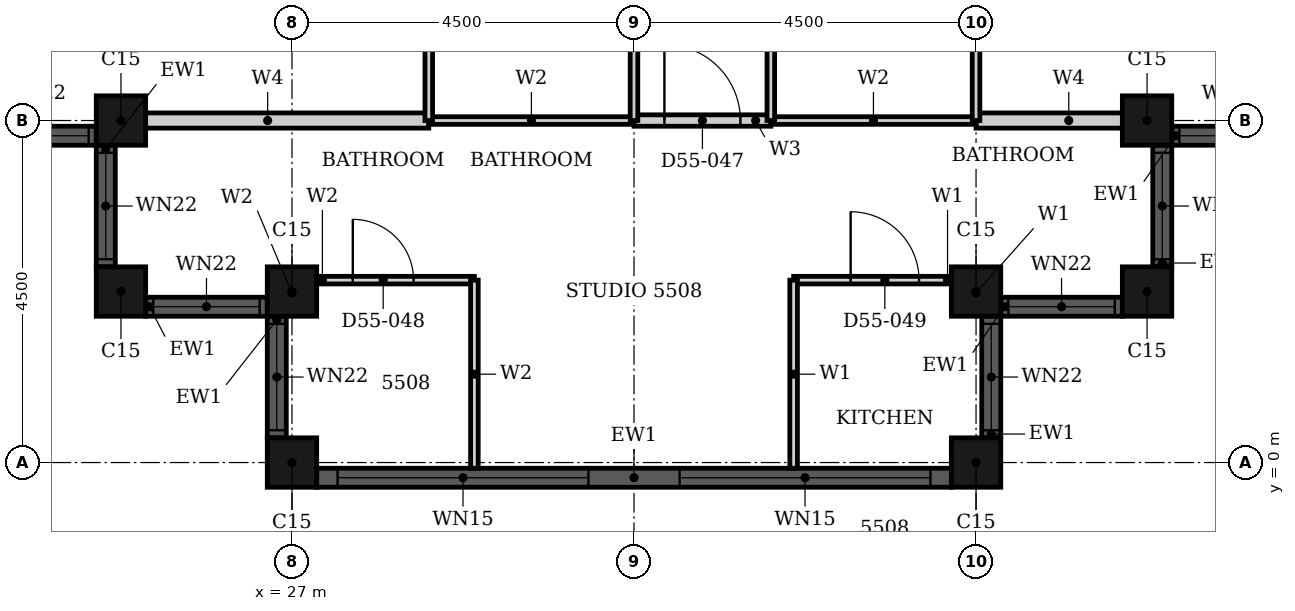
"""IFC4 building model, lengths in metres.
Left out: names, types, materials, properties, quantities, classifications, styles, units other than length and angle.
Written with IfcOpenShell. Run it as: python <this file> out.ifc"""

import sys

from ifc_helpers import new_model, si_unit, direction, frame, frame_2d, origin, origin_2d, place, context, subcontext, project, spatial, rectangle, hollow_rectangle, extrude, element, fill, save


model = new_model("IFC4")
c1 = context("Model", 3, precision=1e-05, world=origin(), true_north=direction((0.0, 1.0)))
c2 = subcontext(c1, "Body", "Model", "MODEL_VIEW")
j1 = project(units=[si_unit("LENGTHUNIT", "METRE"), si_unit("PLANEANGLEUNIT", "RADIAN")], contexts=[c1])
p1 = place(None, origin())
s1 = spatial("IfcSite", under=j1, at=p1, CompositionType="ELEMENT")
p2 = place(p1, origin())
s2 = spatial("IfcBuilding", under=s1, at=p2, CompositionType="ELEMENT")
p3 = place(p2, frame((0.0, 0.0, 218.3)))
s3 = spatial("IfcBuildingStorey", under=s2, at=p3, CompositionType="ELEMENT", Elevation=218.3)
for number, where, z_axis, x_axis in (
    (1, (24.75, 4.5, 0.0), (0.0, 0.0, 1.0), (1.0, 0.0, 0.0)),
    (2, (24.75, 2.25, 0.0), (0.0, 0.0, 1.0), (1.0, 0.0, 0.0)),
    (3, (27.0, 2.25, 0.0), (0.0, 0.0, 1.0), (1.0, 0.0, 0.0)),
    (4, (27.0, 0.0, 0.0), (0.0, 0.0, 1.0), (1.0, 0.0, 0.0)),
    (5, (36.0, 0.0, 0.0), (0.0, 0.0, 1.0), (1.0, 0.0, 0.0)),
    (6, (36.0, 2.25, 0.0), (0.0, 0.0, 1.0), (1.0, 0.0, 0.0)),
    (7, (38.25, 2.25, 0.0), (0.0, 0.0, 1.0), (1.0, 0.0, 0.0)),
    (8, (38.25, 4.5, 0.0), (0.0, 0.0, 1.0), (1.0, 0.0, 0.0)),
):
    element("IfcColumn", number, at=place(p3, frame(where, z_axis=z_axis, x_axis=x_axis)), inside=s3, PredefinedType="COLUMN", context=c2, shape_type="SweptSolid", body=[
        extrude(hollow_rectangle(XDim=0.65, YDim=0.65, WallThickness=0.021, at=origin_2d()), origin(), (0.0, 0.0, 1.0), 3.7),
    ])
p4 = place(p3, frame((22.825, 4.3, 0.0), z_axis=(0.0, 0.0, 1.0), x_axis=(1.0, 0.0, 0.0)))
e9 = element("IfcWall", 9, at=p4, inside=s3, PredefinedType="SOLIDWALL", context=c2, shape_type="SweptSolid", body=[
    extrude(rectangle(XDim=1.6, YDim=0.25, at=frame_2d((0.8, 0.0))), origin(), (0.0, 0.0, 1.0), 3.7),
])
p5 = place(p4, frame((0.1, 0.0, 0.9)))
e10 = element("IfcOpeningElement", 10, at=p5, cuts=e9, PredefinedType="OPENING", context=c2, shape_type="SweptSolid", body=[
    extrude(rectangle(XDim=1.4, YDim=1.85, at=frame_2d((0.7, 0.925))), frame((0.0, 0.135, 0.0), z_axis=(0.0, -1.0, 0.0), x_axis=(1.0, 0.0, 0.0)), (0.0, 0.0, 1.0), 0.27),
])
p6 = place(p3, frame((24.55, 4.175, 0.0), z_axis=(0.0, 0.0, 1.0), x_axis=(0.0, -1.0, 0.0)))
e11 = element("IfcWall", 11, at=p6, inside=s3, PredefinedType="SOLIDWALL", context=c2, shape_type="SweptSolid", body=[
    extrude(rectangle(XDim=1.6, YDim=0.25, at=frame_2d((0.8, 0.0))), origin(), (0.0, 0.0, 1.0), 3.7),
])
p7 = place(p6, frame((0.1, 0.0, 0.9)))
e12 = element("IfcOpeningElement", 12, at=p7, cuts=e11, PredefinedType="OPENING", context=c2, shape_type="SweptSolid", body=[
    extrude(rectangle(XDim=1.4, YDim=1.85, at=frame_2d((0.7, 0.925))), frame((0.0, 0.135, 0.0), z_axis=(0.0, -1.0, 0.0), x_axis=(1.0, 0.0, 0.0)), (0.0, 0.0, 1.0), 0.27),
])
p8 = place(p3, frame((25.075, 2.05, 0.0), z_axis=(0.0, 0.0, 1.0), x_axis=(1.0, 0.0, 0.0)))
e13 = element("IfcWall", 13, at=p8, inside=s3, PredefinedType="SOLIDWALL", context=c2, shape_type="SweptSolid", body=[
    extrude(rectangle(XDim=1.6, YDim=0.25, at=frame_2d((0.8, 0.0))), origin(), (0.0, 0.0, 1.0), 3.7),
])
p9 = place(p8, frame((0.1, 0.0, 0.9)))
e14 = element("IfcOpeningElement", 14, at=p9, cuts=e13, PredefinedType="OPENING", context=c2, shape_type="SweptSolid", body=[
    extrude(rectangle(XDim=1.4, YDim=1.85, at=frame_2d((0.7, 0.925))), frame((0.0, 0.135, 0.0), z_axis=(0.0, -1.0, 0.0), x_axis=(1.0, 0.0, 0.0)), (0.0, 0.0, 1.0), 0.27),
])
p10 = place(p3, frame((26.8, 1.925, 0.0), z_axis=(0.0, 0.0, 1.0), x_axis=(0.0, -1.0, 0.0)))
e15 = element("IfcWall", 15, at=p10, inside=s3, PredefinedType="SOLIDWALL", context=c2, shape_type="SweptSolid", body=[
    extrude(rectangle(XDim=1.6, YDim=0.25, at=frame_2d((0.8, 0.0))), origin(), (0.0, 0.0, 1.0), 3.7),
])
p11 = place(p10, frame((0.1, 0.0, 0.9)))
e16 = element("IfcOpeningElement", 16, at=p11, cuts=e15, PredefinedType="OPENING", context=c2, shape_type="SweptSolid", body=[
    extrude(rectangle(XDim=1.4, YDim=1.85, at=frame_2d((0.7, 0.925))), frame((0.0, 0.135, 0.0), z_axis=(0.0, -1.0, 0.0), x_axis=(1.0, 0.0, 0.0)), (0.0, 0.0, 1.0), 0.27),
])
p12 = place(p3, frame((27.325, -0.2, 0.0), z_axis=(0.0, 0.0, 1.0), x_axis=(1.0, 0.0, 0.0)))
e17 = element("IfcWall", 17, at=p12, inside=s3, PredefinedType="SOLIDWALL", context=c2, shape_type="SweptSolid", body=[
    extrude(rectangle(XDim=8.35, YDim=0.25, at=frame_2d((4.175, 0.0))), origin(), (0.0, 0.0, 1.0), 3.7),
])
p13 = place(p12, frame((0.275, 0.0, 0.45)))
e18 = element("IfcOpeningElement", 18, at=p13, cuts=e17, PredefinedType="OPENING", context=c2, shape_type="SweptSolid", body=[
    extrude(rectangle(XDim=3.3, YDim=2.3, at=frame_2d((1.65, 1.15))), frame((0.0, 0.135, 0.0), z_axis=(0.0, -1.0, 0.0), x_axis=(1.0, 0.0, 0.0)), (0.0, 0.0, 1.0), 0.27),
])
p14 = place(p12, frame((4.775, 0.0, 0.45)))
e19 = element("IfcOpeningElement", 19, at=p14, cuts=e17, PredefinedType="OPENING", context=c2, shape_type="SweptSolid", body=[
    extrude(rectangle(XDim=3.3, YDim=2.3, at=frame_2d((1.65, 1.15))), frame((0.0, 0.135, 0.0), z_axis=(0.0, -1.0, 0.0), x_axis=(1.0, 0.0, 0.0)), (0.0, 0.0, 1.0), 0.27),
])
p15 = place(p3, frame((36.2, 0.325, 0.0), z_axis=(0.0, 0.0, 1.0), x_axis=(0.0, 1.0, 0.0)))
e20 = element("IfcWall", 20, at=p15, inside=s3, PredefinedType="SOLIDWALL", context=c2, shape_type="SweptSolid", body=[
    extrude(rectangle(XDim=1.6, YDim=0.25, at=frame_2d((0.8, 0.0))), origin(), (0.0, 0.0, 1.0), 3.7),
])
p16 = place(p15, frame((0.1, 0.0, 0.9)))
e21 = element("IfcOpeningElement", 21, at=p16, cuts=e20, PredefinedType="OPENING", context=c2, shape_type="SweptSolid", body=[
    extrude(rectangle(XDim=1.4, YDim=1.85, at=frame_2d((0.7, 0.925))), frame((0.0, 0.135, 0.0), z_axis=(0.0, -1.0, 0.0), x_axis=(1.0, 0.0, 0.0)), (0.0, 0.0, 1.0), 0.27),
])
p17 = place(p3, frame((36.325, 2.05, 0.0), z_axis=(0.0, 0.0, 1.0), x_axis=(1.0, 0.0, 0.0)))
e22 = element("IfcWall", 22, at=p17, inside=s3, PredefinedType="SOLIDWALL", context=c2, shape_type="SweptSolid", body=[
    extrude(rectangle(XDim=1.6, YDim=0.25, at=frame_2d((0.8, 0.0))), origin(), (0.0, 0.0, 1.0), 3.7),
])
p18 = place(p17, frame((0.1, 0.0, 0.9)))
e23 = element("IfcOpeningElement", 23, at=p18, cuts=e22, PredefinedType="OPENING", context=c2, shape_type="SweptSolid", body=[
    extrude(rectangle(XDim=1.4, YDim=1.85, at=frame_2d((0.7, 0.925))), frame((0.0, 0.135, 0.0), z_axis=(0.0, -1.0, 0.0), x_axis=(1.0, 0.0, 0.0)), (0.0, 0.0, 1.0), 0.27),
])
p19 = place(p3, frame((38.45, 2.575, 0.0), z_axis=(0.0, 0.0, 1.0), x_axis=(0.0, 1.0, 0.0)))
e24 = element("IfcWall", 24, at=p19, inside=s3, PredefinedType="SOLIDWALL", context=c2, shape_type="SweptSolid", body=[
    extrude(rectangle(XDim=1.6, YDim=0.25, at=frame_2d((0.8, 0.0))), origin(), (0.0, 0.0, 1.0), 3.7),
])
p20 = place(p19, frame((0.1, 0.0, 0.9)))
e25 = element("IfcOpeningElement", 25, at=p20, cuts=e24, PredefinedType="OPENING", context=c2, shape_type="SweptSolid", body=[
    extrude(rectangle(XDim=1.4, YDim=1.85, at=frame_2d((0.7, 0.925))), frame((0.0, 0.135, 0.0), z_axis=(0.0, -1.0, 0.0), x_axis=(1.0, 0.0, 0.0)), (0.0, 0.0, 1.0), 0.27),
])
p21 = place(p3, frame((38.575, 4.3, 0.0), z_axis=(0.0, 0.0, 1.0), x_axis=(1.0, 0.0, 0.0)))
e26 = element("IfcWall", 26, at=p21, inside=s3, PredefinedType="SOLIDWALL", context=c2, shape_type="SweptSolid", body=[
    extrude(rectangle(XDim=1.6, YDim=0.25, at=frame_2d((0.8, 0.0))), origin(), (0.0, 0.0, 1.0), 3.7),
])
p22 = place(p21, frame((0.1, 0.0, 0.9)))
e27 = element("IfcOpeningElement", 27, at=p22, cuts=e26, PredefinedType="OPENING", context=c2, shape_type="SweptSolid", body=[
    extrude(rectangle(XDim=1.4, YDim=1.85, at=frame_2d((0.7, 0.925))), frame((0.0, 0.135, 0.0), z_axis=(0.0, -1.0, 0.0), x_axis=(1.0, 0.0, 0.0)), (0.0, 0.0, 1.0), 0.27),
])
p23 = place(p3, frame((31.5, 4.5, 0.0), z_axis=(0.0, 0.0, 1.0), x_axis=(1.0, 0.0, 0.0)))
e28 = element("IfcWall", 28, at=p23, inside=s3, PredefinedType="PARTITIONING", context=c2, shape_type="SweptSolid", body=[
    extrude(rectangle(XDim=1.8, YDim=0.15, at=frame_2d((0.9, 0.0))), origin(), (0.0, 0.0, 1.0), 3.4),
])
p24 = place(p23, frame((0.4, 0.0, 0.0)))
e29 = element("IfcOpeningElement", 29, at=p24, cuts=e28, PredefinedType="OPENING", context=c2, shape_type="SweptSolid", body=[
    extrude(rectangle(XDim=1.0, YDim=2.2, at=frame_2d((0.5, 1.1))), frame((0.0, 0.085, 0.0), z_axis=(0.0, -1.0, 0.0), x_axis=(1.0, 0.0, 0.0)), (0.0, 0.0, 1.0), 0.17),
])
p25 = place(p3, frame((33.6, 2.4, 0.0), z_axis=(0.0, 0.0, 1.0), x_axis=(1.0, 0.0, 0.0)))
e30 = element("IfcWall", 30, at=p25, inside=s3, PredefinedType="PARTITIONING", context=c2, shape_type="SweptSolid", body=[
    extrude(rectangle(XDim=2.4, YDim=0.1, at=frame_2d((1.2, 0.0))), origin(), (0.0, 0.0, 1.0), 3.4),
])
p26 = place(p25, frame((0.75, 0.0, 0.0)))
e31 = element("IfcOpeningElement", 31, at=p26, cuts=e30, PredefinedType="OPENING", context=c2, shape_type="SweptSolid", body=[
    extrude(rectangle(XDim=0.9, YDim=2.1, at=frame_2d((0.45, 1.05))), frame((0.0, 0.06, 0.0), z_axis=(0.0, -1.0, 0.0), x_axis=(1.0, 0.0, 0.0)), (0.0, 0.0, 1.0), 0.12),
])
p27 = place(p3, frame((33.6, -0.075, 0.0), z_axis=(0.0, 0.0, 1.0), x_axis=(0.0, 1.0, 0.0)))
e32 = element("IfcWall", 32, at=p27, inside=s3, PredefinedType="PARTITIONING", context=c2, shape_type="SweptSolid", body=[
    extrude(rectangle(XDim=2.475, YDim=0.1, at=frame_2d((1.237, 0.0))), origin(), (0.0, 0.0, 1.0), 3.4),
])
p28 = place(p3, frame((36.0, 2.06, 0.0), z_axis=(0.0, 0.0, 1.0), x_axis=(0.0, 1.0, 0.0)))
e33 = element("IfcWall", 33, at=p28, inside=s3, PredefinedType="PARTITIONING", context=c2, shape_type="SweptSolid", body=[
    extrude(rectangle(XDim=0.34, YDim=0.1, at=frame_2d((0.17, 0.0))), origin(), (0.0, 0.0, 1.0), 3.4),
])
p29 = place(p3, frame((36.0, 4.5, 0.0), z_axis=(0.0, 0.0, 1.0), x_axis=(1.0, 0.0, 0.0)))
e34 = element("IfcWall", 34, at=p29, inside=s3, PredefinedType="PARTITIONING", context=c2, shape_type="SweptSolid", body=[
    extrude(rectangle(XDim=2.44, YDim=0.2, at=frame_2d((1.22, 0.0))), origin(), (0.0, 0.0, 1.0), 3.4),
])
p30 = place(p3, frame((24.56, 4.5, 0.0), z_axis=(0.0, 0.0, 1.0), x_axis=(1.0, 0.0, 0.0)))
e35 = element("IfcWall", 35, at=p30, inside=s3, PredefinedType="PARTITIONING", context=c2, shape_type="SweptSolid", body=[
    extrude(rectangle(XDim=4.24, YDim=0.2, at=frame_2d((2.12, 0.0))), origin(), (0.0, 0.0, 1.0), 3.4),
])
p31 = place(p3, frame((27.0, 2.4, 0.0), z_axis=(0.0, 0.0, 1.0), x_axis=(1.0, 0.0, 0.0)))
e36 = element("IfcWall", 36, at=p31, inside=s3, PredefinedType="PARTITIONING", context=c2, shape_type="SweptSolid", body=[
    extrude(rectangle(XDim=2.4, YDim=0.1, at=frame_2d((1.2, 0.0))), origin(), (0.0, 0.0, 1.0), 3.4),
])
p32 = place(p31, frame((0.8, 0.0, 0.0)))
e37 = element("IfcOpeningElement", 37, at=p32, cuts=e36, PredefinedType="OPENING", context=c2, shape_type="SweptSolid", body=[
    extrude(rectangle(XDim=0.8, YDim=2.1, at=frame_2d((0.4, 1.05))), frame((0.0, 0.06, 0.0), z_axis=(0.0, -1.0, 0.0), x_axis=(1.0, 0.0, 0.0)), (0.0, 0.0, 1.0), 0.12),
])
for number, where, z_axis, x_axis in (
    (38, (33.3, 4.5, 0.0), (0.0, 0.0, 1.0), (1.0, 0.0, 0.0)),
    (39, (28.8, 4.5, 0.0), (0.0, 0.0, 1.0), (1.0, 0.0, 0.0)),
):
    element("IfcWall", number, at=place(p3, frame(where, z_axis=z_axis, x_axis=x_axis)), inside=s3, PredefinedType="PARTITIONING", context=c2, shape_type="SweptSolid", body=[
        extrude(rectangle(XDim=2.7, YDim=0.1, at=frame_2d((1.35, 0.0))), origin(), (0.0, 0.0, 1.0), 3.4),
    ])
p33 = place(p3, frame((27.0, 2.06, 0.0), z_axis=(0.0, 0.0, 1.0), x_axis=(0.0, 1.0, 0.0)))
e40 = element("IfcWall", 40, at=p33, inside=s3, PredefinedType="PARTITIONING", context=c2, shape_type="SweptSolid", body=[
    extrude(rectangle(XDim=0.34, YDim=0.1, at=frame_2d((0.17, 0.0))), origin(), (0.0, 0.0, 1.0), 3.4),
])
p34 = place(p3, frame((28.8, 4.5, 0.0), z_axis=(0.0, 0.0, 1.0), x_axis=(0.0, 1.0, 0.0)))
e41 = element("IfcWall", 41, at=p34, inside=s3, PredefinedType="PARTITIONING", context=c2, shape_type="SweptSolid", body=[
    extrude(rectangle(XDim=2.4, YDim=0.1, at=frame_2d((1.2, 0.0))), origin(), (0.0, 0.0, 1.0), 3.4),
])
p35 = place(p3, frame((29.4, -0.075, 0.0), z_axis=(0.0, 0.0, 1.0), x_axis=(0.0, 1.0, 0.0)))
e42 = element("IfcWall", 42, at=p35, inside=s3, PredefinedType="PARTITIONING", context=c2, shape_type="SweptSolid", body=[
    extrude(rectangle(XDim=2.475, YDim=0.1, at=frame_2d((1.237, 0.0))), origin(), (0.0, 0.0, 1.0), 3.4),
])
p36 = place(p3, frame((31.5, 4.5, 0.0), z_axis=(0.0, 0.0, 1.0), x_axis=(0.0, 1.0, 0.0)))
e43 = element("IfcWall", 43, at=p36, inside=s3, PredefinedType="PARTITIONING", context=c2, shape_type="SweptSolid", body=[
    extrude(rectangle(XDim=2.4, YDim=0.1, at=frame_2d((1.2, 0.0))), origin(), (0.0, 0.0, 1.0), 2.68),
])
p37 = place(p3, frame((33.3, 4.5, 0.0), z_axis=(0.0, 0.0, 1.0), x_axis=(0.0, 1.0, 0.0)))
e44 = element("IfcWall", 44, at=p37, inside=s3, PredefinedType="PARTITIONING", context=c2, shape_type="SweptSolid", body=[
    extrude(rectangle(XDim=2.4, YDim=0.1, at=frame_2d((1.2, 0.0))), origin(), (0.0, 0.0, 1.0), 3.4),
])
p38 = place(p3, frame((36.0, 4.5, 0.0), z_axis=(0.0, 0.0, 1.0), x_axis=(0.0, 1.0, 0.0)))
e45 = element("IfcWall", 45, at=p38, inside=s3, PredefinedType="PARTITIONING", context=c2, shape_type="SweptSolid", body=[
    extrude(rectangle(XDim=2.4, YDim=0.1, at=frame_2d((1.2, 0.0))), origin(), (0.0, 0.0, 1.0), 2.68),
])
p39 = place(p5, origin())
e46 = element("IfcWindow", 46, at=p39, inside=s3, PartitioningType="SINGLE_PANEL", PredefinedType="WINDOW", context=c2, shape_type="SweptSolid", body=[
    extrude(rectangle(XDim=1.4, YDim=1.85, at=frame_2d((0.7, 0.925))), frame((0.0, 0.03, 0.0), z_axis=(0.0, -1.0, 0.0), x_axis=(1.0, 0.0, 0.0)), (0.0, 0.0, 1.0), 0.06),
])
fill(e10, e46)
p40 = place(p7, origin())
e47 = element("IfcWindow", 47, at=p40, inside=s3, PartitioningType="SINGLE_PANEL", PredefinedType="WINDOW", context=c2, shape_type="SweptSolid", body=[
    extrude(rectangle(XDim=1.4, YDim=1.85, at=frame_2d((0.7, 0.925))), frame((0.0, 0.03, 0.0), z_axis=(0.0, -1.0, 0.0), x_axis=(1.0, 0.0, 0.0)), (0.0, 0.0, 1.0), 0.06),
])
fill(e12, e47)
p41 = place(p9, origin())
e48 = element("IfcWindow", 48, at=p41, inside=s3, PartitioningType="SINGLE_PANEL", PredefinedType="WINDOW", context=c2, shape_type="SweptSolid", body=[
    extrude(rectangle(XDim=1.4, YDim=1.85, at=frame_2d((0.7, 0.925))), frame((0.0, 0.03, 0.0), z_axis=(0.0, -1.0, 0.0), x_axis=(1.0, 0.0, 0.0)), (0.0, 0.0, 1.0), 0.06),
])
fill(e14, e48)
p42 = place(p11, origin())
e49 = element("IfcWindow", 49, at=p42, inside=s3, PartitioningType="SINGLE_PANEL", PredefinedType="WINDOW", context=c2, shape_type="SweptSolid", body=[
    extrude(rectangle(XDim=1.4, YDim=1.85, at=frame_2d((0.7, 0.925))), frame((0.0, 0.03, 0.0), z_axis=(0.0, -1.0, 0.0), x_axis=(1.0, 0.0, 0.0)), (0.0, 0.0, 1.0), 0.06),
])
fill(e16, e49)
p43 = place(p13, origin())
e50 = element("IfcWindow", 50, at=p43, inside=s3, PartitioningType="SINGLE_PANEL", PredefinedType="WINDOW", context=c2, shape_type="SweptSolid", body=[
    extrude(rectangle(XDim=3.3, YDim=2.3, at=frame_2d((1.65, 1.15))), frame((0.0, 0.03, 0.0), z_axis=(0.0, -1.0, 0.0), x_axis=(1.0, 0.0, 0.0)), (0.0, 0.0, 1.0), 0.06),
])
fill(e18, e50)
p44 = place(p14, origin())
e51 = element("IfcWindow", 51, at=p44, inside=s3, PartitioningType="SINGLE_PANEL", PredefinedType="WINDOW", context=c2, shape_type="SweptSolid", body=[
    extrude(rectangle(XDim=3.3, YDim=2.3, at=frame_2d((1.65, 1.15))), frame((0.0, 0.03, 0.0), z_axis=(0.0, -1.0, 0.0), x_axis=(1.0, 0.0, 0.0)), (0.0, 0.0, 1.0), 0.06),
])
fill(e19, e51)
p45 = place(p16, origin())
e52 = element("IfcWindow", 52, at=p45, inside=s3, PartitioningType="SINGLE_PANEL", PredefinedType="WINDOW", context=c2, shape_type="SweptSolid", body=[
    extrude(rectangle(XDim=1.4, YDim=1.85, at=frame_2d((0.7, 0.925))), frame((0.0, 0.03, 0.0), z_axis=(0.0, -1.0, 0.0), x_axis=(1.0, 0.0, 0.0)), (0.0, 0.0, 1.0), 0.06),
])
fill(e21, e52)
p46 = place(p18, origin())
e53 = element("IfcWindow", 53, at=p46, inside=s3, PartitioningType="SINGLE_PANEL", PredefinedType="WINDOW", context=c2, shape_type="SweptSolid", body=[
    extrude(rectangle(XDim=1.4, YDim=1.85, at=frame_2d((0.7, 0.925))), frame((0.0, 0.03, 0.0), z_axis=(0.0, -1.0, 0.0), x_axis=(1.0, 0.0, 0.0)), (0.0, 0.0, 1.0), 0.06),
])
fill(e23, e53)
p47 = place(p20, origin())
e54 = element("IfcWindow", 54, at=p47, inside=s3, PartitioningType="SINGLE_PANEL", PredefinedType="WINDOW", context=c2, shape_type="SweptSolid", body=[
    extrude(rectangle(XDim=1.4, YDim=1.85, at=frame_2d((0.7, 0.925))), frame((0.0, 0.03, 0.0), z_axis=(0.0, -1.0, 0.0), x_axis=(1.0, 0.0, 0.0)), (0.0, 0.0, 1.0), 0.06),
])
fill(e25, e54)
p48 = place(p22, origin())
e55 = element("IfcWindow", 55, at=p48, inside=s3, PartitioningType="SINGLE_PANEL", PredefinedType="WINDOW", context=c2, shape_type="SweptSolid", body=[
    extrude(rectangle(XDim=1.4, YDim=1.85, at=frame_2d((0.7, 0.925))), frame((0.0, 0.03, 0.0), z_axis=(0.0, -1.0, 0.0), x_axis=(1.0, 0.0, 0.0)), (0.0, 0.0, 1.0), 0.06),
])
fill(e27, e55)
p49 = place(p24, origin())
e56 = element("IfcDoor", 56, at=p49, inside=s3, OperationType="SINGLE_SWING_LEFT", PredefinedType="DOOR", context=c2, shape_type="SweptSolid", body=[
    extrude(rectangle(XDim=1.0, YDim=2.2, at=frame_2d((0.5, 1.1))), frame((0.0, 0.025, 0.0), z_axis=(0.0, -1.0, 0.0), x_axis=(1.0, 0.0, 0.0)), (0.0, 0.0, 1.0), 0.05),
])
fill(e29, e56)
p50 = place(p32, origin())
e57 = element("IfcDoor", 57, at=p50, inside=s3, OperationType="SINGLE_SWING_LEFT", PredefinedType="DOOR", context=c2, shape_type="SweptSolid", body=[
    extrude(rectangle(XDim=0.8, YDim=2.1, at=frame_2d((0.4, 1.05))), frame((0.0, 0.025, 0.0), z_axis=(0.0, -1.0, 0.0), x_axis=(1.0, 0.0, 0.0)), (0.0, 0.0, 1.0), 0.05),
])
fill(e37, e57)
p51 = place(p26, origin())
e58 = element("IfcDoor", 58, at=p51, inside=s3, OperationType="SINGLE_SWING_LEFT", PredefinedType="DOOR", context=c2, shape_type="SweptSolid", body=[
    extrude(rectangle(XDim=0.9, YDim=2.1, at=frame_2d((0.45, 1.05))), frame((0.0, 0.025, 0.0), z_axis=(0.0, -1.0, 0.0), x_axis=(1.0, 0.0, 0.0)), (0.0, 0.0, 1.0), 0.05),
])
fill(e31, e58)
save(model, sys.argv[1])
